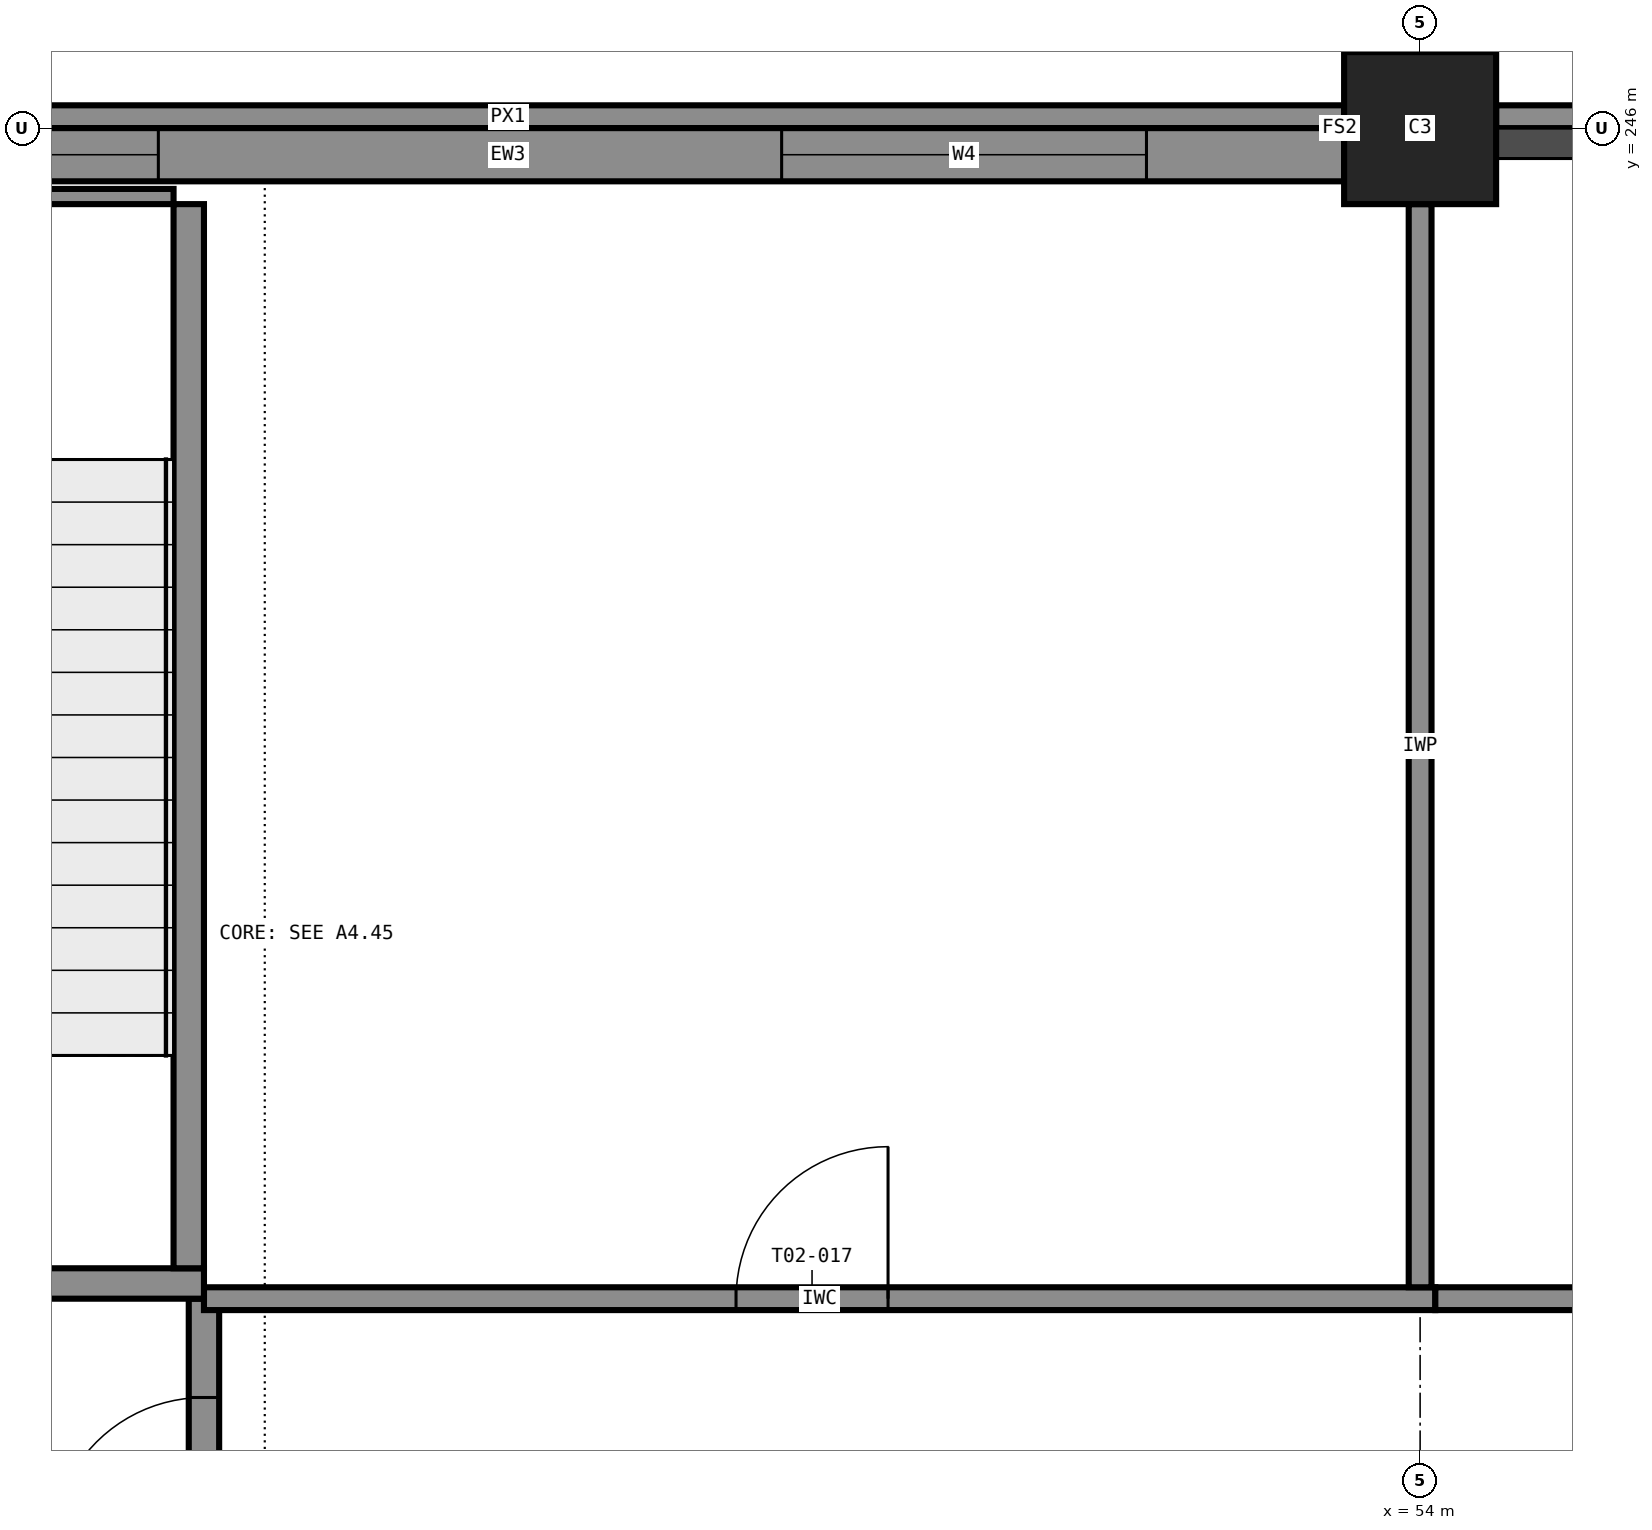
"""IFC4 building model, lengths in metres.
Left out: names, types, materials, properties, quantities, classifications, styles, units other than length and angle.
Written with IfcOpenShell. Run it as: python <this file> out.ifc"""

import sys

from ifc_helpers import new_model, si_unit, direction, frame, frame_2d, origin, origin_2d, place, context, subcontext, project, spatial, rectangle, extrude, element, fill, save


model = new_model("IFC4")
c1 = context("Model", 3, precision=1e-05, world=origin(), true_north=direction((0.0, 1.0)))
c2 = subcontext(c1, "Body", "Model", "MODEL_VIEW")
j1 = project(units=[si_unit("LENGTHUNIT", "METRE"), si_unit("PLANEANGLEUNIT", "RADIAN")], contexts=[c1])
p1 = place(None, origin())
s1 = spatial("IfcSite", under=j1, at=p1, CompositionType="ELEMENT")
p2 = place(p1, origin())
s2 = spatial("IfcBuilding", under=s1, at=p2, CompositionType="ELEMENT")
p3 = place(p2, frame((0.0, 0.0, 12.0)))
s3 = spatial("IfcBuildingStorey", under=s2, at=p3, CompositionType="ELEMENT", Elevation=12.0)
p4 = place(p3, frame((54.0, 246.0, 0.0), z_axis=(0.0, 0.0, 1.0), x_axis=(1.0, 0.0, 0.0)))
e1 = element("IfcColumn", 1, at=p4, inside=s3, PredefinedType="COLUMN", context=c2, shape_type="SweptSolid", body=[
    extrude(rectangle(XDim=1.0, YDim=1.0, at=origin_2d()), origin(), (0.0, 0.0, 1.0), 5.0),
])
p5 = place(p3, frame((42.5, 238.4, 0.0), z_axis=(0.0, 0.0, 1.0), x_axis=(1.0, 0.0, 0.0)))
e2 = element("IfcWall", 2, at=p5, inside=s3, PredefinedType="SHEAR", context=c2, shape_type="SweptSolid", body=[
    extrude(rectangle(XDim=3.5, YDim=0.2, at=frame_2d((1.75, 0.0))), origin(), (0.0, 0.0, 1.0), 5.0),
])
p6 = place(p5, frame((1.15, 0.0, 0.0)))
e3 = element("IfcOpeningElement", 3, at=p6, cuts=e2, PredefinedType="OPENING", context=c2, shape_type="SweptSolid", body=[
    extrude(rectangle(XDim=1.2, YDim=2.1, at=frame_2d((0.6, 1.05))), frame((0.0, 0.11, 0.0), z_axis=(0.0, -1.0, 0.0), x_axis=(1.0, 0.0, 0.0)), (0.0, 0.0, 1.0), 0.22),
])
p7 = place(p3, frame((45.9, 238.5, 0.0), z_axis=(0.0, 0.0, 1.0), x_axis=(0.0, 1.0, 0.0)))
e4 = element("IfcWall", 4, at=p7, inside=s3, PredefinedType="SHEAR", context=c2, shape_type="SweptSolid", body=[
    extrude(rectangle(XDim=7.0, YDim=0.2, at=frame_2d((3.5, 0.0))), origin(), (0.0, 0.0, 1.0), 5.0),
])
p8 = place(p3, frame((42.5, 245.55, 0.0), z_axis=(0.0, 0.0, 1.0), x_axis=(1.0, 0.0, 0.0)))
e5 = element("IfcWall", 5, at=p8, inside=s3, PredefinedType="SHEAR", context=c2, shape_type="SweptSolid", body=[
    extrude(rectangle(XDim=3.3, YDim=0.1, at=frame_2d((1.65, 0.0))), origin(), (0.0, 0.0, 1.0), 4.75),
])
p9 = place(p3, frame((53.5, 245.825, 0.0), z_axis=(0.0, 0.0, 1.0), x_axis=(-1.0, 0.0, 0.0)))
e6 = element("IfcWall", 6, at=p9, inside=s3, PredefinedType="STANDARD", context=c2, shape_type="SweptSolid", body=[
    extrude(rectangle(XDim=11.0, YDim=0.35, at=frame_2d((5.5, 0.0))), origin(), (0.0, 0.0, 1.0), 3.75),
])
p10 = place(p9, frame((1.3, 0.0, 0.6)))
e7 = element("IfcOpeningElement", 7, at=p10, cuts=e6, PredefinedType="OPENING", context=c2, shape_type="SweptSolid", body=[
    extrude(rectangle(XDim=2.4, YDim=2.4, at=frame_2d((1.2, 1.2))), frame((0.0, 0.185, 0.0), z_axis=(0.0, -1.0, 0.0), x_axis=(1.0, 0.0, 0.0)), (0.0, 0.0, 1.0), 0.37),
])
p11 = place(p9, frame((7.8, 0.0, 0.6)))
e8 = element("IfcOpeningElement", 8, at=p11, cuts=e6, PredefinedType="OPENING", context=c2, shape_type="SweptSolid", body=[
    extrude(rectangle(XDim=2.4, YDim=2.4, at=frame_2d((1.2, 1.2))), frame((0.0, 0.185, 0.0), z_axis=(0.0, -1.0, 0.0), x_axis=(1.0, 0.0, 0.0)), (0.0, 0.0, 1.0), 0.37),
])
for number, where, z_axis, x_axis in (
    (9, (65.5, 246.075, 4.75), (0.0, 0.0, 1.0), (-1.0, 0.0, 0.0)),
    (10, (53.5, 246.075, 4.75), (0.0, 0.0, 1.0), (-1.0, 0.0, 0.0)),
):
    element("IfcWall", number, at=place(p3, frame(where, z_axis=z_axis, x_axis=x_axis)), inside=s3, PredefinedType="STANDARD", context=c2, shape_type="SweptSolid", body=[
        extrude(rectangle(XDim=11.0, YDim=0.15, at=frame_2d((5.5, 0.0))), origin(), (0.0, 0.0, 1.0), 0.25),
    ])
p12 = place(p3, frame((46.0, 236.0, 0.0), z_axis=(0.0, 0.0, 1.0), x_axis=(0.0, 1.0, 0.0)))
e11 = element("IfcWall", 11, at=p12, inside=s3, PredefinedType="PARTITIONING", context=c2, shape_type="SweptSolid", body=[
    extrude(rectangle(XDim=2.3, YDim=0.2, at=frame_2d((1.15, 0.0))), origin(), (0.0, 0.0, 1.0), 4.75),
])
p13 = place(p12, frame((0.65, 0.0, 0.0)))
e12 = element("IfcOpeningElement", 12, at=p13, cuts=e11, PredefinedType="OPENING", context=c2, shape_type="SweptSolid", body=[
    extrude(rectangle(XDim=1.0, YDim=2.1, at=frame_2d((0.5, 1.05))), frame((0.0, 0.11, 0.0), z_axis=(0.0, -1.0, 0.0), x_axis=(1.0, 0.0, 0.0)), (0.0, 0.0, 1.0), 0.22),
])
p14 = place(p3, frame((46.0, 238.3, 0.0), z_axis=(0.0, 0.0, 1.0), x_axis=(1.0, 0.0, 0.0)))
e13 = element("IfcWall", 13, at=p14, inside=s3, PredefinedType="PARTITIONING", context=c2, shape_type="SweptSolid", body=[
    extrude(rectangle(XDim=8.1, YDim=0.15, at=frame_2d((4.05, 0.0))), origin(), (0.0, 0.0, 1.0), 4.75),
])
p15 = place(p14, frame((3.5, 0.0, 0.0)))
e14 = element("IfcOpeningElement", 14, at=p15, cuts=e13, PredefinedType="OPENING", context=c2, shape_type="SweptSolid", body=[
    extrude(rectangle(XDim=1.0, YDim=2.1, at=frame_2d((0.5, 1.05))), frame((0.0, 0.085, 0.0), z_axis=(0.0, -1.0, 0.0), x_axis=(1.0, 0.0, 0.0)), (0.0, 0.0, 1.0), 0.17),
])
p16 = place(p3, frame((54.1, 238.3, 0.0), z_axis=(0.0, 0.0, 1.0), x_axis=(1.0, 0.0, 0.0)))
e15 = element("IfcWall", 15, at=p16, inside=s3, PredefinedType="PARTITIONING", context=c2, shape_type="SweptSolid", body=[
    extrude(rectangle(XDim=12.0, YDim=0.15, at=frame_2d((6.0, 0.0))), origin(), (0.0, 0.0, 1.0), 4.75),
])
p17 = place(p16, frame((3.4, 0.0, 0.0)))
e16 = element("IfcOpeningElement", 16, at=p17, cuts=e15, PredefinedType="OPENING", context=c2, shape_type="SweptSolid", body=[
    extrude(rectangle(XDim=1.0, YDim=2.1, at=frame_2d((0.5, 1.05))), frame((0.0, 0.085, 0.0), z_axis=(0.0, -1.0, 0.0), x_axis=(1.0, 0.0, 0.0)), (0.0, 0.0, 1.0), 0.17),
])
p18 = place(p16, frame((8.4, 0.0, 0.0)))
e17 = element("IfcOpeningElement", 17, at=p18, cuts=e15, PredefinedType="OPENING", context=c2, shape_type="SweptSolid", body=[
    extrude(rectangle(XDim=1.0, YDim=2.1, at=frame_2d((0.5, 1.05))), frame((0.0, 0.085, 0.0), z_axis=(0.0, -1.0, 0.0), x_axis=(1.0, 0.0, 0.0)), (0.0, 0.0, 1.0), 0.17),
])
p19 = place(p3, frame((54.0, 245.5, 0.0), z_axis=(0.0, 0.0, 1.0), x_axis=(0.0, -1.0, 0.0)))
e18 = element("IfcWall", 18, at=p19, inside=s3, PredefinedType="PARTITIONING", context=c2, shape_type="SweptSolid", body=[
    extrude(rectangle(XDim=7.125, YDim=0.15, at=frame_2d((3.562, 0.0))), origin(), (0.0, 0.0, 1.0), 3.75),
])
p20 = place(p10, origin())
e19 = element("IfcWindow", 19, at=p20, inside=s3, PartitioningType="SINGLE_PANEL", PredefinedType="WINDOW", context=c2, shape_type="SweptSolid", body=[
    extrude(rectangle(XDim=2.4, YDim=2.4, at=frame_2d((1.2, 1.2))), frame((0.0, 0.03, 0.0), z_axis=(0.0, -1.0, 0.0), x_axis=(1.0, 0.0, 0.0)), (0.0, 0.0, 1.0), 0.06),
])
fill(e7, e19)
p21 = place(p11, origin())
e20 = element("IfcWindow", 20, at=p21, inside=s3, PartitioningType="SINGLE_PANEL", PredefinedType="WINDOW", context=c2, shape_type="SweptSolid", body=[
    extrude(rectangle(XDim=2.4, YDim=2.4, at=frame_2d((1.2, 1.2))), frame((0.0, 0.03, 0.0), z_axis=(0.0, -1.0, 0.0), x_axis=(1.0, 0.0, 0.0)), (0.0, 0.0, 1.0), 0.06),
])
fill(e8, e20)
p22 = place(p13, origin())
e21 = element("IfcDoor", 21, at=p22, inside=s3, OperationType="SINGLE_SWING_LEFT", PredefinedType="DOOR", context=c2, shape_type="SweptSolid", body=[
    extrude(rectangle(XDim=1.0, YDim=2.1, at=frame_2d((0.5, 1.05))), frame((0.0, 0.025, 0.0), z_axis=(0.0, -1.0, 0.0), x_axis=(1.0, 0.0, 0.0)), (0.0, 0.0, 1.0), 0.05),
])
fill(e12, e21)
p23 = place(p15, origin())
e22 = element("IfcDoor", 22, at=p23, inside=s3, OperationType="SINGLE_SWING_RIGHT", PredefinedType="DOOR", context=c2, shape_type="SweptSolid", body=[
    extrude(rectangle(XDim=1.0, YDim=2.1, at=frame_2d((0.5, 1.05))), frame((0.0, 0.025, 0.0), z_axis=(0.0, -1.0, 0.0), x_axis=(1.0, 0.0, 0.0)), (0.0, 0.0, 1.0), 0.05),
])
fill(e14, e22)
save(model, sys.argv[1])
